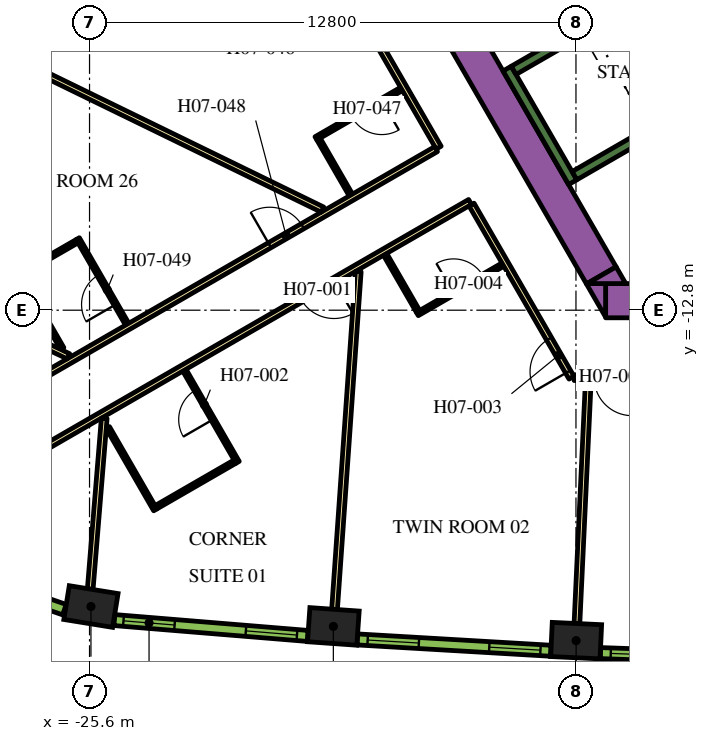
"""IFC4 building model, lengths in metres.
Left out: names, types, materials, properties, quantities, classifications, styles, units other than length and angle.
Written with IfcOpenShell. Run it as: python <this file> out.ifc"""

import sys

from ifc_helpers import new_model, si_unit, direction, frame, frame_2d, origin, origin_2d, place, context, subcontext, project, spatial, polyline, rectangle, outline, extrude, element, fill, save


model = new_model("IFC4")
c1 = context("Model", 3, precision=1e-05, world=origin(), true_north=direction((0.0, 1.0)))
c2 = subcontext(c1, "Body", "Model", "MODEL_VIEW")
j1 = project(units=[si_unit("LENGTHUNIT", "METRE"), si_unit("PLANEANGLEUNIT", "RADIAN")], contexts=[c1])
p1 = place(None, origin())
s1 = spatial("IfcSite", under=j1, at=p1, CompositionType="ELEMENT")
p2 = place(p1, origin())
s2 = spatial("IfcBuilding", under=s1, at=p2, CompositionType="ELEMENT")
p3 = place(p2, frame((0.0, 0.0, 99.3)))
s3 = spatial("IfcBuildingStorey", under=s2, at=p3, CompositionType="ELEMENT", Elevation=99.3)
for number, where, z_axis, x_axis in (
    (1, (-25.563, -20.597, 0.0), (0.0, 0.0, 1.0), (0.987, -0.159, 0.0)),
    (2, (-19.184, -21.12, 0.0), (0.0, 0.0, 1.0), (0.998, -0.07, 0.0)),
    (3, (-12.795, -21.494, 0.0), (0.0, 0.0, 1.0), (0.999, -0.047, 0.0)),
):
    element("IfcColumn", number, at=place(p3, frame(where, z_axis=z_axis, x_axis=x_axis)), inside=s3, PredefinedType="COLUMN", context=c2, shape_type="SweptSolid", body=[
        extrude(rectangle(XDim=1.3, YDim=0.9, at=origin_2d()), origin(), (0.0, 0.0, 1.0), 3.9),
    ])
p4 = place(p3, frame((-12.019, -12.55, 0.0), z_axis=(0.0, 0.0, 1.0), x_axis=(1.0, 0.0, 0.0)))
e4 = element("IfcWall", 4, at=p4, inside=s3, PredefinedType="SOLIDWALL", context=c2, shape_type="SweptSolid", body=[
    extrude(rectangle(XDim=21.63, YDim=0.9, at=frame_2d((10.815, 0.0))), origin(), (0.0, 0.0, 1.0), 3.9),
])
p5 = place(p3, origin())
e5 = element("IfcWall", 5, at=p5, inside=s3, PredefinedType="SOLIDWALL", context=c2, shape_type="SweptSolid", body=[
    extrude(outline(polyline([(-12.529, -12.1), (-12.021, -12.1), (-12.021, -12.98), (-12.529, -12.1)])), origin(), (0.0, 0.0, 1.0), 3.9),
])
p6 = place(p3, frame((-12.134, -11.883, 0.0), z_axis=(0.0, 0.0, 1.0), x_axis=(-0.500005339912, 0.866022320763, 0.0)))
e6 = element("IfcWall", 6, at=p6, inside=s3, PredefinedType="SOLIDWALL", context=c2, shape_type="SweptSolid", body=[
    extrude(rectangle(XDim=9.488, YDim=0.9, at=frame_2d((4.744, 0.0))), origin(), (0.0, 0.0, 1.0), 3.9),
])
e7 = element("IfcWall", 7, at=p5, inside=s3, PredefinedType="SOLIDWALL", context=c2, shape_type="SweptSolid", body=[
    extrude(outline(polyline([(-11.489, -12.1), (-12.505, -12.1), (-11.743, -11.66), (-11.489, -12.1)])), origin(), (0.0, 0.0, 1.0), 3.9),
])
p7 = place(p3, frame((-12.885, -9.431, 0.0), z_axis=(0.0, 0.0, 1.0), x_axis=(-0.500020560727, 0.866013532718, 0.0)))
e8 = element("IfcWall", 8, at=p7, inside=s3, PredefinedType="SOLIDWALL", context=c2, shape_type="SweptSolid", body=[
    extrude(rectangle(XDim=3.45, YDim=0.25, at=frame_2d((1.725, 0.0))), origin(), (0.0, 0.0, 1.0), 3.9),
])
p8 = place(p3, frame((-14.44, -6.49, 0.0), z_axis=(0.0, 0.0, 1.0), x_axis=(0.866022966069, 0.500004222222, 0.0)))
e9 = element("IfcWall", 9, at=p8, inside=s3, PredefinedType="SOLIDWALL", context=c2, shape_type="SweptSolid", body=[
    extrude(rectangle(XDim=6.8, YDim=0.25, at=frame_2d((3.4, 0.0))), origin(), (0.0, 0.0, 1.0), 3.9),
])
p9 = place(p3, frame((-12.84, -9.261, 0.0), z_axis=(0.0, 0.0, 1.0), x_axis=(0.866016039709, 0.500016218704, 0.0)))
e10 = element("IfcWall", 10, at=p9, inside=s3, PredefinedType="SOLIDWALL", context=c2, shape_type="SweptSolid", body=[
    extrude(rectangle(XDim=7.05, YDim=0.25, at=frame_2d((3.525, 0.0))), origin(), (0.0, 0.0, 1.0), 3.9),
])
p10 = place(p3, frame((-16.412, -8.523, 0.0), z_axis=(0.0, 0.0, 1.0), x_axis=(-0.500001929737, 0.866024289647, 0.0)))
e11 = element("IfcWall", 11, at=p10, inside=s3, PredefinedType="PARTITIONING", context=c2, shape_type="SweptSolid", body=[
    extrude(rectangle(XDim=5.268, YDim=0.15, at=frame_2d((2.634, 0.0))), origin(), (0.0, 0.0, 1.0), 2.75),
])
p11 = place(p10, frame((4.088, 0.0, 0.0)))
e12 = element("IfcOpeningElement", 12, at=p11, cuts=e11, PredefinedType="OPENING", context=c2, shape_type="SweptSolid", body=[
    extrude(rectangle(XDim=1.0, YDim=2.1, at=frame_2d((0.5, 1.05))), frame((0.0, 0.085, 0.0), z_axis=(0.0, -1.0, 0.0), x_axis=(1.0, 0.0, 0.0)), (0.0, 0.0, 1.0), 0.17),
])
p12 = place(p3, frame((-28.211, -15.335, 0.0), z_axis=(0.0, 0.0, 1.0), x_axis=(0.866025884867, 0.49999916674, 0.0)))
e13 = element("IfcWall", 13, at=p12, inside=s3, PredefinedType="PARTITIONING", context=c2, shape_type="SweptSolid", body=[
    extrude(rectangle(XDim=13.543, YDim=0.15, at=frame_2d((6.772, 0.0))), origin(), (0.0, 0.0, 1.0), 2.75),
])
p13 = place(p12, frame((8.488, 0.0, 0.0)))
e14 = element("IfcOpeningElement", 14, at=p13, cuts=e13, PredefinedType="OPENING", context=c2, shape_type="SweptSolid", body=[
    extrude(rectangle(XDim=1.0, YDim=2.1, at=frame_2d((0.5, 1.05))), frame((0.0, 0.085, 0.0), z_axis=(0.0, -1.0, 0.0), x_axis=(1.0, 0.0, 0.0)), (0.0, 0.0, 1.0), 0.17),
])
p14 = place(p3, frame((-15.587, -9.952, 0.0), z_axis=(0.0, 0.0, 1.0), x_axis=(-0.866017869832, -0.500013048961, 0.0)))
e15 = element("IfcWall", 15, at=p14, inside=s3, PredefinedType="PARTITIONING", context=c2, shape_type="SweptSolid", body=[
    extrude(rectangle(XDim=13.624, YDim=0.15, at=frame_2d((6.812, 0.0))), origin(), (0.0, 0.0, 1.0), 2.75),
])
p15 = place(p14, frame((4.134, 0.0, 0.0)))
e16 = element("IfcOpeningElement", 16, at=p15, cuts=e15, PredefinedType="OPENING", context=c2, shape_type="SweptSolid", body=[
    extrude(rectangle(XDim=1.0, YDim=2.1, at=frame_2d((0.5, 1.05))), frame((0.0, 0.085, 0.0), z_axis=(0.0, -1.0, 0.0), x_axis=(1.0, 0.0, 0.0)), (0.0, 0.0, 1.0), 0.17),
])
p16 = place(p3, frame((-12.918, -14.575, 0.0), z_axis=(0.0, 0.0, 1.0), x_axis=(-0.500009150678, 0.866020120573, 0.0)))
e17 = element("IfcWall", 17, at=p16, inside=s3, PredefinedType="PARTITIONING", context=c2, shape_type="SweptSolid", body=[
    extrude(rectangle(XDim=5.258, YDim=0.15, at=frame_2d((2.629, 0.0))), origin(), (0.0, 0.0, 1.0), 2.75),
])
p17 = place(p16, frame((0.18, 0.0, 0.0)))
e18 = element("IfcOpeningElement", 18, at=p17, cuts=e17, PredefinedType="OPENING", context=c2, shape_type="SweptSolid", body=[
    extrude(rectangle(XDim=1.0, YDim=2.1, at=frame_2d((0.5, 1.05))), frame((0.0, 0.085, 0.0), z_axis=(0.0, -1.0, 0.0), x_axis=(1.0, 0.0, 0.0)), (0.0, 0.0, 1.0), 0.17),
])
p18 = place(p3, frame((12.918, -14.575, 0.0), z_axis=(0.0, 0.0, 1.0), x_axis=(-1.0, 0.0, 0.0)))
e19 = element("IfcWall", 19, at=p18, inside=s3, PredefinedType="PARTITIONING", context=c2, shape_type="SweptSolid", body=[
    extrude(rectangle(XDim=25.766, YDim=0.15, at=frame_2d((12.883, 0.0))), origin(), (0.0, 0.0, 1.0), 2.75),
])
p19 = place(p18, frame((24.24, 0.0, 0.0)))
e20 = element("IfcOpeningElement", 20, at=p19, cuts=e19, PredefinedType="OPENING", context=c2, shape_type="SweptSolid", body=[
    extrude(rectangle(XDim=1.0, YDim=2.1, at=frame_2d((0.5, 1.05))), frame((0.0, 0.085, 0.0), z_axis=(0.0, -1.0, 0.0), x_axis=(1.0, 0.0, 0.0)), (0.0, 0.0, 1.0), 0.17),
])
p20 = place(p18, frame((13.144, 0.0, 0.0)))
e21 = element("IfcOpeningElement", 21, at=p20, cuts=e19, PredefinedType="OPENING", context=c2, shape_type="SweptSolid", body=[
    extrude(rectangle(XDim=1.0, YDim=2.1, at=frame_2d((0.5, 1.05))), frame((0.0, 0.085, 0.0), z_axis=(0.0, -1.0, 0.0), x_axis=(1.0, 0.0, 0.0)), (0.0, 0.0, 1.0), 0.17),
])
p21 = place(p18, frame((11.693, 0.0, 0.0)))
e22 = element("IfcOpeningElement", 22, at=p21, cuts=e19, PredefinedType="OPENING", context=c2, shape_type="SweptSolid", body=[
    extrude(rectangle(XDim=1.0, YDim=2.1, at=frame_2d((0.5, 1.05))), frame((0.0, 0.085, 0.0), z_axis=(0.0, -1.0, 0.0), x_axis=(1.0, 0.0, 0.0)), (0.0, 0.0, 1.0), 0.17),
])
p22 = place(p18, frame((0.596, 0.0, 0.0)))
e23 = element("IfcOpeningElement", 23, at=p22, cuts=e19, PredefinedType="OPENING", context=c2, shape_type="SweptSolid", body=[
    extrude(rectangle(XDim=1.0, YDim=2.1, at=frame_2d((0.5, 1.05))), frame((0.0, 0.085, 0.0), z_axis=(0.0, -1.0, 0.0), x_axis=(1.0, 0.0, 0.0)), (0.0, 0.0, 1.0), 0.17),
])
p23 = place(p3, frame((-30.231, -12.085, 0.0), z_axis=(0.0, 0.0, 1.0), x_axis=(0.904001132572, -0.427530060122, 0.0)))
e24 = element("IfcWall", 24, at=p23, inside=s3, PredefinedType="PARTITIONING", context=c2, shape_type="SweptSolid", body=[
    extrude(rectangle(XDim=4.51, YDim=0.15, at=frame_2d((2.255, 0.0))), origin(), (0.0, 0.0, 1.0), 2.75),
])
p24 = place(p3, frame((-25.582, -20.138, 0.0), z_axis=(0.0, 0.0, 1.0), x_axis=(0.081746132986, 0.996653184283, 0.0)))
e25 = element("IfcWall", 25, at=p24, inside=s3, PredefinedType="PARTITIONING", context=c2, shape_type="SweptSolid", body=[
    extrude(rectangle(XDim=4.51, YDim=0.15, at=frame_2d((2.255, 0.0))), origin(), (0.0, 0.0, 1.0), 2.75),
])
p25 = place(p3, frame((-27.479, -6.251, 0.0), z_axis=(0.0, 0.0, 1.0), x_axis=(0.898945877276, -0.438059710231, 0.0)))
e26 = element("IfcWall", 26, at=p25, inside=s3, PredefinedType="PARTITIONING", context=c2, shape_type="SweptSolid", body=[
    extrude(rectangle(XDim=8.909, YDim=0.15, at=frame_2d((4.455, 0.0))), origin(), (0.0, 0.0, 1.0), 2.75),
])
p26 = place(p3, frame((-19.153, -20.671, 0.0), z_axis=(0.0, 0.0, 1.0), x_axis=(0.070070736723, 0.997542025107, 0.0)))
e27 = element("IfcWall", 27, at=p26, inside=s3, PredefinedType="PARTITIONING", context=c2, shape_type="SweptSolid", body=[
    extrude(rectangle(XDim=8.909, YDim=0.15, at=frame_2d((4.455, 0.0))), origin(), (0.0, 0.0, 1.0), 2.75),
])
p27 = place(p3, frame((-12.774, -21.045, 0.0), z_axis=(0.0, 0.0, 1.0), x_axis=(0.046750341626, 0.998906605023, 0.0)))
e28 = element("IfcWall", 28, at=p27, inside=s3, PredefinedType="PARTITIONING", context=c2, shape_type="SweptSolid", body=[
    extrude(rectangle(XDim=6.392, YDim=0.15, at=frame_2d((3.196, 0.0))), origin(), (0.0, 0.0, 1.0), 2.75),
])
p28 = place(p3, frame((-21.704, -16.803, 0.0), z_axis=(0.0, 0.0, 1.0), x_axis=(-0.500049511043, 0.865996816683, 0.0)))
e29 = element("IfcWall", 29, at=p28, inside=s3, PredefinedType="PARTITIONING", context=c2, shape_type="SweptSolid", body=[
    extrude(rectangle(XDim=2.8, YDim=0.1, at=frame_2d((1.4, 0.0))), origin(), (0.0, 0.0, 1.0), 2.75),
])
p29 = place(p28, frame((1.3, 0.0, 0.0)))
e30 = element("IfcOpeningElement", 30, at=p29, cuts=e29, PredefinedType="OPENING", context=c2, shape_type="SweptSolid", body=[
    extrude(rectangle(XDim=0.9, YDim=2.1, at=frame_2d((0.45, 1.05))), frame((0.0, 0.06, 0.0), z_axis=(0.0, -1.0, 0.0), x_axis=(1.0, 0.0, 0.0)), (0.0, 0.0, 1.0), 0.12),
])
p30 = place(p3, frame((-21.772, -16.785, 0.0), z_axis=(0.0, 0.0, 1.0), x_axis=(-0.866024647952, -0.500001309137, 0.0)))
e31 = element("IfcWall", 31, at=p30, inside=s3, PredefinedType="PARTITIONING", context=c2, shape_type="SweptSolid", body=[
    extrude(rectangle(XDim=2.4, YDim=0.1, at=frame_2d((1.2, 0.0))), origin(), (0.0, 0.0, 1.0), 2.75),
])
p31 = place(p3, frame((-25.119, -15.888, 0.0), z_axis=(0.0, 0.0, 1.0), x_axis=(0.500046524342, -0.865998541277, 0.0)))
e32 = element("IfcWall", 32, at=p31, inside=s3, PredefinedType="PARTITIONING", context=c2, shape_type="SweptSolid", body=[
    extrude(rectangle(XDim=2.5, YDim=0.1, at=frame_2d((1.25, 0.0))), origin(), (0.0, 0.0, 1.0), 2.75),
])
p32 = place(p3, frame((-16.974, -12.9, 0.0), z_axis=(0.0, 0.0, 1.0), x_axis=(0.865997922154, 0.500047596559, 0.0)))
e33 = element("IfcWall", 33, at=p32, inside=s3, PredefinedType="PARTITIONING", context=c2, shape_type="SweptSolid", body=[
    extrude(rectangle(XDim=2.6, YDim=0.1, at=frame_2d((1.3, 0.0))), origin(), (0.0, 0.0, 1.0), 2.75),
])
p33 = place(p32, frame((1.1, 0.0, 0.0)))
e34 = element("IfcOpeningElement", 34, at=p33, cuts=e33, PredefinedType="OPENING", context=c2, shape_type="SweptSolid", body=[
    extrude(rectangle(XDim=0.9, YDim=2.1, at=frame_2d((0.45, 1.05))), frame((0.0, 0.06, 0.0), z_axis=(0.0, -1.0, 0.0), x_axis=(1.0, 0.0, 0.0)), (0.0, 0.0, 1.0), 0.12),
])
p34 = place(p3, frame((-16.956, -12.832, 0.0), z_axis=(0.0, 0.0, 1.0), x_axis=(-0.499978980201, 0.866037539231, 0.0)))
e35 = element("IfcWall", 35, at=p34, inside=s3, PredefinedType="PARTITIONING", context=c2, shape_type="SweptSolid", body=[
    extrude(rectangle(XDim=1.73, YDim=0.1, at=frame_2d((0.865, 0.0))), origin(), (0.0, 0.0, 1.0), 2.75),
])
p35 = place(p3, frame((-17.39, -6.979, 0.0), z_axis=(0.0, 0.0, 1.0), x_axis=(-0.866021400173, -0.500006934395, 0.0)))
e36 = element("IfcWall", 36, at=p35, inside=s3, PredefinedType="PARTITIONING", context=c2, shape_type="SweptSolid", body=[
    extrude(rectangle(XDim=2.6, YDim=0.1, at=frame_2d((1.3, 0.0))), origin(), (0.0, 0.0, 1.0), 2.75),
])
p36 = place(p35, frame((0.6, 0.0, 0.0)))
e37 = element("IfcOpeningElement", 37, at=p36, cuts=e36, PredefinedType="OPENING", context=c2, shape_type="SweptSolid", body=[
    extrude(rectangle(XDim=0.9, YDim=2.1, at=frame_2d((0.45, 1.05))), frame((0.0, 0.06, 0.0), z_axis=(0.0, -1.0, 0.0), x_axis=(1.0, 0.0, 0.0)), (0.0, 0.0, 1.0), 0.12),
])
p37 = place(p3, frame((-19.574, -8.297, 0.0), z_axis=(0.0, 0.0, 1.0), x_axis=(0.500062241894, -0.865989465428, 0.0)))
e38 = element("IfcWall", 38, at=p37, inside=s3, PredefinedType="PARTITIONING", context=c2, shape_type="SweptSolid", body=[
    extrude(rectangle(XDim=1.7, YDim=0.1, at=frame_2d((0.85, 0.0))), origin(), (0.0, 0.0, 1.0), 2.75),
])
p38 = place(p3, frame((-24.61, -13.169, 0.0), z_axis=(0.0, 0.0, 1.0), x_axis=(-0.500006934395, 0.866021400173, 0.0)))
e39 = element("IfcWall", 39, at=p38, inside=s3, PredefinedType="PARTITIONING", context=c2, shape_type="SweptSolid", body=[
    extrude(rectangle(XDim=2.6, YDim=0.1, at=frame_2d((1.3, 0.0))), origin(), (0.0, 0.0, 1.0), 2.75),
])
p39 = place(p38, frame((0.6, 0.0, 0.0)))
e40 = element("IfcOpeningElement", 40, at=p39, cuts=e39, PredefinedType="OPENING", context=c2, shape_type="SweptSolid", body=[
    extrude(rectangle(XDim=0.9, YDim=2.1, at=frame_2d((0.45, 1.05))), frame((0.0, 0.06, 0.0), z_axis=(0.0, -1.0, 0.0), x_axis=(1.0, 0.0, 0.0)), (0.0, 0.0, 1.0), 0.12),
])
p40 = place(p3, frame((-25.928, -10.986, 0.0), z_axis=(0.0, 0.0, 1.0), x_axis=(-0.865989465428, -0.500062241894, 0.0)))
e41 = element("IfcWall", 41, at=p40, inside=s3, PredefinedType="PARTITIONING", context=c2, shape_type="SweptSolid", body=[
    extrude(rectangle(XDim=1.7, YDim=0.1, at=frame_2d((0.85, 0.0))), origin(), (0.0, 0.0, 1.0), 2.75),
])
p41 = place(p3, frame((-26.319, -13.81, 0.0), z_axis=(0.0, 0.0, 1.0), x_axis=(-0.499952165731, 0.866053019151, 0.0)))
e42 = element("IfcWall", 42, at=p41, inside=s3, PredefinedType="PARTITIONING", context=c2, shape_type="SweptSolid", body=[
    extrude(rectangle(XDim=2.3, YDim=0.1, at=frame_2d((1.15, 0.0))), origin(), (0.0, 0.0, 1.0), 2.75),
])
p42 = place(p3, frame((-24.946, -20.954, 0.0), z_axis=(0.0, 0.0, 1.0), x_axis=(0.99665273362, -0.081751627308, 0.0)))
e43 = element("IfcWall", 43, at=p42, inside=s3, PredefinedType="SOLIDWALL", context=c2, shape_type="SweptSolid", body=[
    extrude(rectangle(XDim=5.107, YDim=0.29, at=frame_2d((2.553, 0.0))), origin(), (0.0, 0.0, 1.0), 3.65),
])
p43 = place(p42, frame((0.24, 0.0, 0.9)))
e44 = element("IfcOpeningElement", 44, at=p43, cuts=e43, PredefinedType="OPENING", context=c2, shape_type="SweptSolid", body=[
    extrude(rectangle(XDim=1.35, YDim=2.15, at=frame_2d((0.675, 1.075))), frame((0.0, 0.155, 0.0), z_axis=(0.0, -1.0, 0.0), x_axis=(1.0, 0.0, 0.0)), (0.0, 0.0, 1.0), 0.31),
])
p44 = place(p42, frame((3.471, 0.0, 0.9)))
e45 = element("IfcOpeningElement", 45, at=p44, cuts=e43, PredefinedType="OPENING", context=c2, shape_type="SweptSolid", body=[
    extrude(rectangle(XDim=1.35, YDim=2.15, at=frame_2d((0.675, 1.075))), frame((0.0, 0.155, 0.0), z_axis=(0.0, -1.0, 0.0), x_axis=(1.0, 0.0, 0.0)), (0.0, 0.0, 1.0), 0.31),
])
p45 = place(p3, frame((-18.553, -21.463, 0.0), z_axis=(0.0, 0.0, 1.0), x_axis=(0.998290511436, -0.058447025388, 0.0)))
e46 = element("IfcWall", 46, at=p45, inside=s3, PredefinedType="SOLIDWALL", context=c2, shape_type="SweptSolid", body=[
    extrude(rectangle(XDim=5.1, YDim=0.29, at=frame_2d((2.55, 0.0))), origin(), (0.0, 0.0, 1.0), 3.65),
])
p46 = place(p45, frame((0.273, 0.0, 0.9)))
e47 = element("IfcOpeningElement", 47, at=p46, cuts=e46, PredefinedType="OPENING", context=c2, shape_type="SweptSolid", body=[
    extrude(rectangle(XDim=1.35, YDim=2.15, at=frame_2d((0.675, 1.075))), frame((0.0, 0.155, 0.0), z_axis=(0.0, -1.0, 0.0), x_axis=(1.0, 0.0, 0.0)), (0.0, 0.0, 1.0), 0.31),
])
p47 = place(p45, frame((3.478, 0.0, 0.9)))
e48 = element("IfcOpeningElement", 48, at=p47, cuts=e46, PredefinedType="OPENING", context=c2, shape_type="SweptSolid", body=[
    extrude(rectangle(XDim=1.35, YDim=2.15, at=frame_2d((0.675, 1.075))), frame((0.0, 0.155, 0.0), z_axis=(0.0, -1.0, 0.0), x_axis=(1.0, 0.0, 0.0)), (0.0, 0.0, 1.0), 0.31),
])
p48 = place(p3, frame((-12.157, -21.822, 0.0), z_axis=(0.0, 0.0, 1.0), x_axis=(0.999385993957, -0.035037623812, 0.0)))
e49 = element("IfcWall", 49, at=p48, inside=s3, PredefinedType="SOLIDWALL", context=c2, shape_type="SweptSolid", body=[
    extrude(rectangle(XDim=5.101, YDim=0.29, at=frame_2d((2.55, 0.0))), origin(), (0.0, 0.0, 1.0), 3.65),
])
p49 = place(p48, frame((0.273, 0.0, 0.9)))
e50 = element("IfcOpeningElement", 50, at=p49, cuts=e49, PredefinedType="OPENING", context=c2, shape_type="SweptSolid", body=[
    extrude(rectangle(XDim=1.35, YDim=2.15, at=frame_2d((0.675, 1.075))), frame((0.0, 0.155, 0.0), z_axis=(0.0, -1.0, 0.0), x_axis=(1.0, 0.0, 0.0)), (0.0, 0.0, 1.0), 0.31),
])
p50 = place(p48, frame((3.478, 0.0, 0.9)))
e51 = element("IfcOpeningElement", 51, at=p50, cuts=e49, PredefinedType="OPENING", context=c2, shape_type="SweptSolid", body=[
    extrude(rectangle(XDim=1.35, YDim=2.15, at=frame_2d((0.675, 1.075))), frame((0.0, 0.155, 0.0), z_axis=(0.0, -1.0, 0.0), x_axis=(1.0, 0.0, 0.0)), (0.0, 0.0, 1.0), 0.31),
])
p51 = place(p3, frame((-27.981, -20.086, 0.0), z_axis=(0.0, 0.0, 1.0), x_axis=(0.945385815453, -0.325953462844, 0.0)))
e52 = element("IfcWall", 52, at=p51, inside=s3, PredefinedType="SOLIDWALL", context=c2, shape_type="SweptSolid", body=[
    extrude(rectangle(XDim=1.819, YDim=0.29, at=frame_2d((0.91, 0.0))), origin(), (0.0, 0.0, 1.0), 3.65),
])
p52 = place(p51, frame((0.46, 0.0, 0.9)))
e53 = element("IfcOpeningElement", 53, at=p52, cuts=e52, PredefinedType="OPENING", context=c2, shape_type="SweptSolid", body=[
    extrude(rectangle(XDim=0.9, YDim=2.15, at=frame_2d((0.45, 1.075))), frame((0.0, 0.155, 0.0), z_axis=(0.0, -1.0, 0.0), x_axis=(1.0, 0.0, 0.0)), (0.0, 0.0, 1.0), 0.31),
])
p53 = place(p15, origin())
e54 = element("IfcDoor", 54, at=p53, inside=s3, OperationType="SINGLE_SWING_LEFT", PredefinedType="DOOR", context=c2, shape_type="SweptSolid", body=[
    extrude(rectangle(XDim=1.0, YDim=2.1, at=frame_2d((0.5, 1.05))), frame((0.0, 0.025, 0.0), z_axis=(0.0, -1.0, 0.0), x_axis=(1.0, 0.0, 0.0)), (0.0, 0.0, 1.0), 0.05),
])
fill(e16, e54)
p54 = place(p29, origin())
e55 = element("IfcDoor", 55, at=p54, inside=s3, OperationType="SINGLE_SWING_LEFT", PredefinedType="DOOR", context=c2, shape_type="SweptSolid", body=[
    extrude(rectangle(XDim=0.9, YDim=2.1, at=frame_2d((0.45, 1.05))), frame((0.0, 0.025, 0.0), z_axis=(0.0, -1.0, 0.0), x_axis=(1.0, 0.0, 0.0)), (0.0, 0.0, 1.0), 0.05),
])
fill(e30, e55)
p55 = place(p17, origin())
e56 = element("IfcDoor", 56, at=p55, inside=s3, OperationType="SINGLE_SWING_LEFT", PredefinedType="DOOR", context=c2, shape_type="SweptSolid", body=[
    extrude(rectangle(XDim=1.0, YDim=2.1, at=frame_2d((0.5, 1.05))), frame((0.0, 0.025, 0.0), z_axis=(0.0, -1.0, 0.0), x_axis=(1.0, 0.0, 0.0)), (0.0, 0.0, 1.0), 0.05),
])
fill(e18, e56)
p56 = place(p33, origin())
e57 = element("IfcDoor", 57, at=p56, inside=s3, OperationType="SINGLE_SWING_LEFT", PredefinedType="DOOR", context=c2, shape_type="SweptSolid", body=[
    extrude(rectangle(XDim=0.9, YDim=2.1, at=frame_2d((0.45, 1.05))), frame((0.0, 0.025, 0.0), z_axis=(0.0, -1.0, 0.0), x_axis=(1.0, 0.0, 0.0)), (0.0, 0.0, 1.0), 0.05),
])
fill(e34, e57)
p57 = place(p19, origin())
e58 = element("IfcDoor", 58, at=p57, inside=s3, OperationType="SINGLE_SWING_RIGHT", PredefinedType="DOOR", context=c2, shape_type="SweptSolid", body=[
    extrude(rectangle(XDim=1.0, YDim=2.1, at=frame_2d((0.5, 1.05))), frame((0.0, 0.025, 0.0), z_axis=(0.0, -1.0, 0.0), x_axis=(1.0, 0.0, 0.0)), (0.0, 0.0, 1.0), 0.05),
])
fill(e20, e58)
p58 = place(p36, origin())
e59 = element("IfcDoor", 59, at=p58, inside=s3, OperationType="SINGLE_SWING_LEFT", PredefinedType="DOOR", context=c2, shape_type="SweptSolid", body=[
    extrude(rectangle(XDim=0.9, YDim=2.1, at=frame_2d((0.45, 1.05))), frame((0.0, 0.025, 0.0), z_axis=(0.0, -1.0, 0.0), x_axis=(1.0, 0.0, 0.0)), (0.0, 0.0, 1.0), 0.05),
])
fill(e37, e59)
p59 = place(p13, origin())
e60 = element("IfcDoor", 60, at=p59, inside=s3, OperationType="SINGLE_SWING_RIGHT", PredefinedType="DOOR", context=c2, shape_type="SweptSolid", body=[
    extrude(rectangle(XDim=1.0, YDim=2.1, at=frame_2d((0.5, 1.05))), frame((0.0, 0.025, 0.0), z_axis=(0.0, -1.0, 0.0), x_axis=(1.0, 0.0, 0.0)), (0.0, 0.0, 1.0), 0.05),
])
fill(e14, e60)
p60 = place(p39, origin())
e61 = element("IfcDoor", 61, at=p60, inside=s3, OperationType="SINGLE_SWING_LEFT", PredefinedType="DOOR", context=c2, shape_type="SweptSolid", body=[
    extrude(rectangle(XDim=0.9, YDim=2.1, at=frame_2d((0.45, 1.05))), frame((0.0, 0.025, 0.0), z_axis=(0.0, -1.0, 0.0), x_axis=(1.0, 0.0, 0.0)), (0.0, 0.0, 1.0), 0.05),
])
fill(e40, e61)
p61 = place(p43, origin())
e62 = element("IfcWindow", 62, at=p61, inside=s3, PartitioningType="DOUBLE_PANEL_VERTICAL", PredefinedType="WINDOW", context=c2, shape_type="SweptSolid", body=[
    extrude(rectangle(XDim=1.35, YDim=2.15, at=frame_2d((0.675, 1.075))), frame((0.0, 0.015, 0.0), z_axis=(0.0, -1.0, 0.0), x_axis=(1.0, 0.0, 0.0)), (0.0, 0.0, 1.0), 0.06),
])
fill(e44, e62)
p62 = place(p44, origin())
e63 = element("IfcWindow", 63, at=p62, inside=s3, PartitioningType="DOUBLE_PANEL_VERTICAL", PredefinedType="WINDOW", context=c2, shape_type="SweptSolid", body=[
    extrude(rectangle(XDim=1.35, YDim=2.15, at=frame_2d((0.675, 1.075))), frame((0.0, 0.015, 0.0), z_axis=(0.0, -1.0, 0.0), x_axis=(1.0, 0.0, 0.0)), (0.0, 0.0, 1.0), 0.06),
])
fill(e45, e63)
p63 = place(p46, origin())
e64 = element("IfcWindow", 64, at=p63, inside=s3, PartitioningType="DOUBLE_PANEL_VERTICAL", PredefinedType="WINDOW", context=c2, shape_type="SweptSolid", body=[
    extrude(rectangle(XDim=1.35, YDim=2.15, at=frame_2d((0.675, 1.075))), frame((0.0, 0.015, 0.0), z_axis=(0.0, -1.0, 0.0), x_axis=(1.0, 0.0, 0.0)), (0.0, 0.0, 1.0), 0.06),
])
fill(e47, e64)
p64 = place(p47, origin())
e65 = element("IfcWindow", 65, at=p64, inside=s3, PartitioningType="DOUBLE_PANEL_VERTICAL", PredefinedType="WINDOW", context=c2, shape_type="SweptSolid", body=[
    extrude(rectangle(XDim=1.35, YDim=2.15, at=frame_2d((0.675, 1.075))), frame((0.0, 0.015, 0.0), z_axis=(0.0, -1.0, 0.0), x_axis=(1.0, 0.0, 0.0)), (0.0, 0.0, 1.0), 0.06),
])
fill(e48, e65)
p65 = place(p49, origin())
e66 = element("IfcWindow", 66, at=p65, inside=s3, PartitioningType="DOUBLE_PANEL_VERTICAL", PredefinedType="WINDOW", context=c2, shape_type="SweptSolid", body=[
    extrude(rectangle(XDim=1.35, YDim=2.15, at=frame_2d((0.675, 1.075))), frame((0.0, 0.015, 0.0), z_axis=(0.0, -1.0, 0.0), x_axis=(1.0, 0.0, 0.0)), (0.0, 0.0, 1.0), 0.06),
])
fill(e50, e66)
save(model, sys.argv[1])
